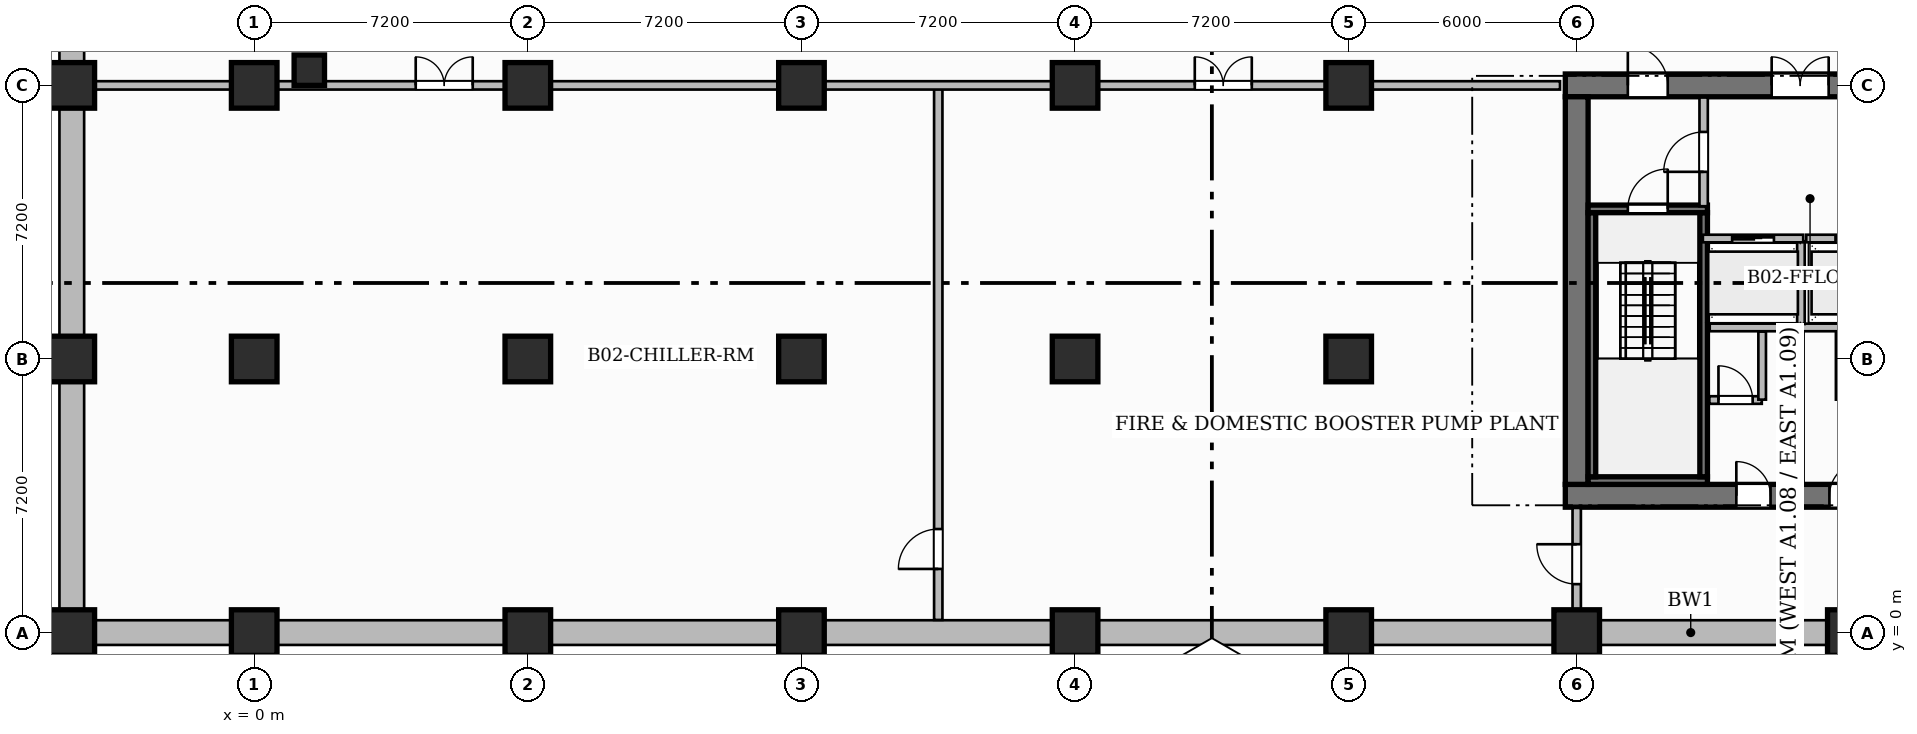
"""IFC4 building model, lengths in metres.
Left out: names, types, materials, properties, quantities, classifications, styles, units other than length and angle.
Written with IfcOpenShell. Run it as: python <this file> out.ifc"""

import sys

from ifc_helpers import new_model, si_unit, direction, frame, frame_2d, origin, origin_2d, place, context, subcontext, project, spatial, rectangle, extrude, source, transform, mapped, element, fill, save


model = new_model("IFC4")
c1 = context("Model", 3, precision=1e-05, world=origin(), true_north=direction((0.0, 1.0)))
c2 = subcontext(c1, "Body", "Model", "MODEL_VIEW")
j1 = project(units=[si_unit("LENGTHUNIT", "METRE"), si_unit("PLANEANGLEUNIT", "RADIAN")], contexts=[c1])
p1 = place(None, origin())
s1 = spatial("IfcSite", under=j1, at=p1, CompositionType="ELEMENT")
p2 = place(p1, origin())
s2 = spatial("IfcBuilding", under=s1, at=p2, CompositionType="ELEMENT")
p3 = place(p2, frame((0.0, 0.0, -13.0)))
s3 = spatial("IfcBuildingStorey", under=s2, at=p3, CompositionType="ELEMENT", Elevation=-13.0)
p4 = place(p3, frame((-4.8, 0.0, -0.4), z_axis=(0.0, 0.0, 1.0), x_axis=(1.0, 0.0, 0.0)))
e1 = element("IfcWall", 1, at=p4, inside=s3, PredefinedType="USERDEFINED", context=c2, shape_type="SweptSolid", body=[
    extrude(rectangle(XDim=85.2, YDim=0.65, at=frame_2d((42.6, 0.0))), origin(), (0.0, 0.0, 1.0), 6.9),
])
p5 = place(p3, frame((-4.8, 46.45, -0.4), z_axis=(0.0, 0.0, 1.0), x_axis=(0.0, -1.0, 0.0)))
e2 = element("IfcWall", 2, at=p5, inside=s3, PredefinedType="USERDEFINED", context=c2, shape_type="SweptSolid", body=[
    extrude(rectangle(XDim=46.1, YDim=0.65, at=frame_2d((23.05, 0.0))), origin(), (0.0, 0.0, 1.0), 6.9),
])
p6 = place(p3, frame((34.5, 3.6, -0.4), z_axis=(0.0, 0.0, 1.0), x_axis=(1.0, 0.0, 0.0)))
e3 = element("IfcWall", 3, at=p6, inside=s3, PredefinedType="SHEAR", context=c2, shape_type="SweptSolid", body=[
    extrude(rectangle(XDim=15.6, YDim=0.6, at=frame_2d((7.8, 0.0))), origin(), (0.0, 0.0, 1.0), 6.9),
])
p7 = place(p6, frame((4.5, 0.0, 0.4)))
e4 = element("IfcOpeningElement", 4, at=p7, cuts=e3, PredefinedType="OPENING", context=c2, shape_type="SweptSolid", body=[
    extrude(rectangle(XDim=0.9, YDim=2.1, at=frame_2d((0.45, 1.05))), frame((0.0, 0.31, 0.0), z_axis=(0.0, -1.0, 0.0), x_axis=(1.0, 0.0, 0.0)), (0.0, 0.0, 1.0), 0.62),
])
p8 = place(p6, frame((6.95, 0.0, 0.4)))
e5 = element("IfcOpeningElement", 5, at=p8, cuts=e3, PredefinedType="OPENING", context=c2, shape_type="SweptSolid", body=[
    extrude(rectangle(XDim=0.9, YDim=2.1, at=frame_2d((0.45, 1.05))), frame((0.0, 0.31, 0.0), z_axis=(0.0, -1.0, 0.0), x_axis=(1.0, 0.0, 0.0)), (0.0, 0.0, 1.0), 0.62),
])
p9 = place(p3, frame((34.5, 14.4, -0.4), z_axis=(0.0, 0.0, 1.0), x_axis=(1.0, 0.0, 0.0)))
e6 = element("IfcWall", 6, at=p9, inside=s3, PredefinedType="SHEAR", context=c2, shape_type="SweptSolid", body=[
    extrude(rectangle(XDim=15.6, YDim=0.6, at=frame_2d((7.8, 0.0))), origin(), (0.0, 0.0, 1.0), 6.9),
])
p10 = place(p9, frame((5.43, 0.0, 0.4)))
e7 = element("IfcOpeningElement", 7, at=p10, cuts=e6, PredefinedType="OPENING", context=c2, shape_type="SweptSolid", body=[
    extrude(rectangle(XDim=1.5, YDim=2.2, at=frame_2d((0.75, 1.1))), frame((0.0, 0.31, 0.0), z_axis=(0.0, -1.0, 0.0), x_axis=(1.0, 0.0, 0.0)), (0.0, 0.0, 1.0), 0.62),
])
p11 = place(p9, frame((1.645, 0.0, 0.4)))
e8 = element("IfcOpeningElement", 8, at=p11, cuts=e6, PredefinedType="OPENING", context=c2, shape_type="SweptSolid", body=[
    extrude(rectangle(XDim=1.05, YDim=2.15, at=frame_2d((0.525, 1.075))), frame((0.0, 0.31, 0.0), z_axis=(0.0, -1.0, 0.0), x_axis=(1.0, 0.0, 0.0)), (0.0, 0.0, 1.0), 0.62),
])
p12 = place(p9, frame((11.275, 0.0, 0.4)))
e9 = element("IfcOpeningElement", 9, at=p12, cuts=e6, PredefinedType="OPENING", context=c2, shape_type="SweptSolid", body=[
    extrude(rectangle(XDim=1.05, YDim=2.15, at=frame_2d((0.525, 1.075))), frame((0.0, 0.31, 0.0), z_axis=(0.0, -1.0, 0.0), x_axis=(1.0, 0.0, 0.0)), (0.0, 0.0, 1.0), 0.62),
])
p13 = place(p3, frame((34.8, 3.9, -0.4), z_axis=(0.0, 0.0, 1.0), x_axis=(0.0, 1.0, 0.0)))
e10 = element("IfcWall", 10, at=p13, inside=s3, PredefinedType="SHEAR", context=c2, shape_type="SweptSolid", body=[
    extrude(rectangle(XDim=10.2, YDim=0.6, at=frame_2d((5.1, 0.0))), origin(), (0.0, 0.0, 1.0), 6.9),
])
m1 = source(origin(), c2, "Body", "SweptSolid", [
    extrude(rectangle(XDim=1.2, YDim=1.2, at=origin_2d()), origin(), (0.0, 0.0, 1.0), 6.9),
])
for number, where, z_axis, x_axis in (
    (11, (-4.8, 0.0, -0.4), (0.0, 0.0, 1.0), (1.0, 0.0, 0.0)),
    (12, (-4.8, 7.2, -0.4), (0.0, 0.0, 1.0), (1.0, 0.0, 0.0)),
    (13, (-4.8, 14.4, -0.4), (0.0, 0.0, 1.0), (1.0, 0.0, 0.0)),
    (14, (0.0, 0.0, -0.4), (0.0, 0.0, 1.0), (1.0, 0.0, 0.0)),
    (15, (0.0, 7.2, -0.4), (0.0, 0.0, 1.0), (1.0, 0.0, 0.0)),
    (16, (0.0, 14.4, -0.4), (0.0, 0.0, 1.0), (1.0, 0.0, 0.0)),
    (17, (7.2, 0.0, -0.4), (0.0, 0.0, 1.0), (1.0, 0.0, 0.0)),
    (18, (7.2, 7.2, -0.4), (0.0, 0.0, 1.0), (1.0, 0.0, 0.0)),
    (19, (7.2, 14.4, -0.4), (0.0, 0.0, 1.0), (1.0, 0.0, 0.0)),
    (20, (14.4, 0.0, -0.4), (0.0, 0.0, 1.0), (1.0, 0.0, 0.0)),
    (21, (14.4, 7.2, -0.4), (0.0, 0.0, 1.0), (1.0, 0.0, 0.0)),
    (22, (14.4, 14.4, -0.4), (0.0, 0.0, 1.0), (1.0, 0.0, 0.0)),
    (23, (21.6, 0.0, -0.4), (0.0, 0.0, 1.0), (1.0, 0.0, 0.0)),
    (24, (21.6, 7.2, -0.4), (0.0, 0.0, 1.0), (1.0, 0.0, 0.0)),
    (25, (21.6, 14.4, -0.4), (0.0, 0.0, 1.0), (1.0, 0.0, 0.0)),
    (26, (28.8, 0.0, -0.4), (0.0, 0.0, 1.0), (1.0, 0.0, 0.0)),
    (27, (28.8, 7.2, -0.4), (0.0, 0.0, 1.0), (1.0, 0.0, 0.0)),
    (28, (28.8, 14.4, -0.4), (0.0, 0.0, 1.0), (1.0, 0.0, 0.0)),
    (29, (34.8, 0.0, -0.4), (0.0, 0.0, 1.0), (1.0, 0.0, 0.0)),
    (30, (42.0, 0.0, -0.4), (0.0, 0.0, 1.0), (1.0, 0.0, 0.0)),
):
    element("IfcColumn", number, at=place(p3, frame(where, z_axis=z_axis, x_axis=x_axis)), inside=s3, PredefinedType="COLUMN", context=c2, shape_type="MappedRepresentation", body=[
        mapped(m1, transform((0.0, 0.0, 0.0), scale=1.0)),
    ])
m2 = source(origin(), c2, "Body", "SweptSolid", [
    extrude(rectangle(XDim=0.8, YDim=0.8, at=origin_2d()), origin(), (0.0, 0.0, 1.0), 6.9),
])
p14 = place(p3, frame((1.45, 14.8, -0.4), z_axis=(0.0, 0.0, 1.0), x_axis=(1.0, 0.0, 0.0)))
e31 = element("IfcColumn", 31, at=p14, inside=s3, PredefinedType="COLUMN", context=c2, shape_type="MappedRepresentation", body=[
    mapped(m2, transform((0.0, 0.0, 0.0), scale=1.0)),
])
p15 = place(p3, frame((35.1, 4.0, -0.4), z_axis=(0.0, 0.0, 1.0), x_axis=(1.0, 0.0, 0.0)))
e32 = element("IfcWall", 32, at=p15, inside=s3, PredefinedType="SHEAR", context=c2, shape_type="SweptSolid", body=[
    extrude(rectangle(XDim=3.14, YDim=0.2, at=frame_2d((1.57, 0.0))), origin(), (0.0, 0.0, 1.0), 6.9),
])
for number, where, z_axis, x_axis in (
    (33, (35.2, 4.1, -0.4), (0.0, 0.0, 1.0), (0.0, 1.0, 0.0)),
    (34, (38.14, 4.1, -0.4), (0.0, 0.0, 1.0), (0.0, 1.0, 0.0)),
):
    element("IfcWall", number, at=place(p3, frame(where, z_axis=z_axis, x_axis=x_axis)), inside=s3, PredefinedType="SHEAR", context=c2, shape_type="SweptSolid", body=[
        extrude(rectangle(XDim=6.95, YDim=0.2, at=frame_2d((3.475, 0.0))), origin(), (0.0, 0.0, 1.0), 6.9),
    ])
p16 = place(p3, frame((35.1, 11.15, -0.4), z_axis=(0.0, 0.0, 1.0), x_axis=(1.0, 0.0, 0.0)))
e35 = element("IfcWall", 35, at=p16, inside=s3, PredefinedType="SHEAR", context=c2, shape_type="SweptSolid", body=[
    extrude(rectangle(XDim=3.14, YDim=0.2, at=frame_2d((1.57, 0.0))), origin(), (0.0, 0.0, 1.0), 6.9),
])
p17 = place(p16, frame((1.045, 0.0, 0.4)))
e36 = element("IfcOpeningElement", 36, at=p17, cuts=e35, PredefinedType="OPENING", context=c2, shape_type="SweptSolid", body=[
    extrude(rectangle(XDim=1.05, YDim=2.2, at=frame_2d((0.525, 1.1))), frame((0.0, 0.11, 0.0), z_axis=(0.0, -1.0, 0.0), x_axis=(1.0, 0.0, 0.0)), (0.0, 0.0, 1.0), 0.22),
])
p18 = place(p3, frame((38.3, 8.03, 0.0), z_axis=(0.0, 0.0, 1.0), x_axis=(1.0, 0.0, 0.0)))
e37 = element("IfcWall", 37, at=p18, inside=s3, PredefinedType="PARTITIONING", context=c2, shape_type="SweptSolid", body=[
    extrude(rectangle(XDim=4.74, YDim=0.2, at=frame_2d((2.37, 0.0))), origin(), (0.0, 0.0, 1.0), 6.1),
])
p19 = place(p3, frame((40.7, 8.12, 0.0), z_axis=(0.0, 0.0, 1.0), x_axis=(0.0, 1.0, 0.0)))
e38 = element("IfcWall", 38, at=p19, inside=s3, PredefinedType="PARTITIONING", context=c2, shape_type="SweptSolid", body=[
    extrude(rectangle(XDim=2.18, YDim=0.2, at=frame_2d((1.09, 0.0))), origin(), (0.0, 0.0, 1.0), 6.1),
])
p20 = place(p3, frame((38.14, 11.22, 0.0), z_axis=(0.0, 0.0, 1.0), x_axis=(0.0, 1.0, 0.0)))
e39 = element("IfcWall", 39, at=p20, inside=s3, PredefinedType="PARTITIONING", context=c2, shape_type="SweptSolid", body=[
    extrude(rectangle(XDim=2.86, YDim=0.22, at=frame_2d((1.43, 0.0))), origin(), (0.0, 0.0, 1.0), 6.1),
])
p21 = place(p20, frame((0.905, 0.0, 0.0)))
e40 = element("IfcOpeningElement", 40, at=p21, cuts=e39, PredefinedType="OPENING", context=c2, shape_type="SweptSolid", body=[
    extrude(rectangle(XDim=1.05, YDim=2.15, at=frame_2d((0.525, 1.075))), frame((0.0, 0.12, 0.0), z_axis=(0.0, -1.0, 0.0), x_axis=(1.0, 0.0, 0.0)), (0.0, 0.0, 1.0), 0.24),
])
p22 = place(p3, frame((38.29, 6.12, 0.0), z_axis=(0.0, 0.0, 1.0), x_axis=(1.0, 0.0, 0.0)))
e41 = element("IfcWall", 41, at=p22, inside=s3, PredefinedType="PARTITIONING", context=c2, shape_type="SweptSolid", body=[
    extrude(rectangle(XDim=1.38, YDim=0.2, at=frame_2d((0.69, 0.0))), origin(), (0.0, 0.0, 1.0), 6.1),
])
p23 = place(p22, frame((0.24, 0.0, 0.0)))
e42 = element("IfcOpeningElement", 42, at=p23, cuts=e41, PredefinedType="OPENING", context=c2, shape_type="SweptSolid", body=[
    extrude(rectangle(XDim=0.9, YDim=2.1, at=frame_2d((0.45, 1.05))), frame((0.0, 0.11, 0.0), z_axis=(0.0, -1.0, 0.0), x_axis=(1.0, 0.0, 0.0)), (0.0, 0.0, 1.0), 0.22),
])
for number, where, z_axis, x_axis in (
    (43, (39.68, 6.13, 0.0), (0.0, 0.0, 1.0), (0.0, 1.0, 0.0)),
    (44, (41.72, 6.13, 0.0), (0.0, 0.0, 1.0), (0.0, 1.0, 0.0)),
):
    element("IfcWall", number, at=place(p3, frame(where, z_axis=z_axis, x_axis=x_axis)), inside=s3, PredefinedType="PARTITIONING", context=c2, shape_type="SweptSolid", body=[
        extrude(rectangle(XDim=1.79, YDim=0.2, at=frame_2d((0.895, 0.0))), origin(), (0.0, 0.0, 1.0), 6.1),
    ])
p24 = place(p3, frame((40.7, 3.92, 0.0), z_axis=(0.0, 0.0, 1.0), x_axis=(0.0, 1.0, 0.0)))
e45 = element("IfcWall", 45, at=p24, inside=s3, PredefinedType="PARTITIONING", context=c2, shape_type="SweptSolid", body=[
    extrude(rectangle(XDim=3.99, YDim=0.14, at=frame_2d((1.995, 0.0))), origin(), (0.0, 0.0, 1.0), 6.1),
])
p25 = place(p3, frame((18.0, 0.333, 0.0), z_axis=(0.0, 0.0, 1.0), x_axis=(0.0, 1.0, 0.0)))
e46 = element("IfcWall", 46, at=p25, inside=s3, PredefinedType="PARTITIONING", context=c2, shape_type="SweptSolid", body=[
    extrude(rectangle(XDim=13.977, YDim=0.22, at=frame_2d((6.989, 0.0))), origin(), (0.0, 0.0, 1.0), 5.335),
])
p26 = place(p25, frame((1.342, 0.0, 0.0)))
e47 = element("IfcOpeningElement", 47, at=p26, cuts=e46, PredefinedType="OPENING", context=c2, shape_type="SweptSolid", body=[
    extrude(rectangle(XDim=1.05, YDim=2.15, at=frame_2d((0.525, 1.075))), frame((0.0, 0.12, 0.0), z_axis=(0.0, -1.0, 0.0), x_axis=(1.0, 0.0, 0.0)), (0.0, 0.0, 1.0), 0.24),
])
p27 = place(p3, frame((-4.31, 14.4, 0.0), z_axis=(0.0, 0.0, 1.0), x_axis=(1.0, 0.0, 0.0)))
e48 = element("IfcWall", 48, at=p27, inside=s3, PredefinedType="PARTITIONING", context=c2, shape_type="SweptSolid", body=[
    extrude(rectangle(XDim=38.67, YDim=0.22, at=frame_2d((19.335, 0.0))), origin(), (0.0, 0.0, 1.0), 5.185),
])
p28 = place(p27, frame((8.56, 0.0, 0.0)))
e49 = element("IfcOpeningElement", 49, at=p28, cuts=e48, PredefinedType="OPENING", context=c2, shape_type="SweptSolid", body=[
    extrude(rectangle(XDim=1.5, YDim=2.2, at=frame_2d((0.75, 1.1))), frame((0.0, 0.12, 0.0), z_axis=(0.0, -1.0, 0.0), x_axis=(1.0, 0.0, 0.0)), (0.0, 0.0, 1.0), 0.24),
])
p29 = place(p27, frame((29.06, 0.0, 0.0)))
e50 = element("IfcOpeningElement", 50, at=p29, cuts=e48, PredefinedType="OPENING", context=c2, shape_type="SweptSolid", body=[
    extrude(rectangle(XDim=1.5, YDim=2.2, at=frame_2d((0.75, 1.1))), frame((0.0, 0.12, 0.0), z_axis=(0.0, -1.0, 0.0), x_axis=(1.0, 0.0, 0.0)), (0.0, 0.0, 1.0), 0.24),
])
p30 = place(p3, frame((34.8, 0.37, 0.0), z_axis=(0.0, 0.0, 1.0), x_axis=(0.0, 1.0, 0.0)))
e51 = element("IfcWall", 51, at=p30, inside=s3, PredefinedType="PARTITIONING", context=c2, shape_type="SweptSolid", body=[
    extrude(rectangle(XDim=2.91, YDim=0.22, at=frame_2d((1.455, 0.0))), origin(), (0.0, 0.0, 1.0), 6.1),
])
p31 = place(p30, frame((0.905, 0.0, 0.0)))
e52 = element("IfcOpeningElement", 52, at=p31, cuts=e51, PredefinedType="OPENING", context=c2, shape_type="SweptSolid", body=[
    extrude(rectangle(XDim=1.05, YDim=2.15, at=frame_2d((0.525, 1.075))), frame((0.0, 0.12, 0.0), z_axis=(0.0, -1.0, 0.0), x_axis=(1.0, 0.0, 0.0)), (0.0, 0.0, 1.0), 0.24),
])
p32 = place(p3, frame((38.12, 10.37, 0.0), z_axis=(0.0, 0.0, 1.0), x_axis=(1.0, 0.0, 0.0)))
e53 = element("IfcWall", 53, at=p32, inside=s3, PredefinedType="PARTITIONING", context=c2, shape_type="SweptSolid", body=[
    extrude(rectangle(XDim=2.64, YDim=0.2, at=frame_2d((1.32, 0.0))), origin(), (0.0, 0.0, 1.0), 6.1),
])
p33 = place(p32, frame((0.77, 0.0, 0.0)))
e54 = element("IfcOpeningElement", 54, at=p33, cuts=e53, PredefinedType="OPENING", context=c2, shape_type="SweptSolid", body=[
    extrude(rectangle(XDim=1.1, YDim=2.2, at=frame_2d((0.55, 1.1))), frame((0.0, 0.11, 0.0), z_axis=(0.0, -1.0, 0.0), x_axis=(1.0, 0.0, 0.0)), (0.0, 0.0, 1.0), 0.22),
])
p34 = place(p3, frame((40.84, 10.37, 0.0), z_axis=(0.0, 0.0, 1.0), x_axis=(1.0, 0.0, 0.0)))
e55 = element("IfcWall", 55, at=p34, inside=s3, PredefinedType="PARTITIONING", context=c2, shape_type="SweptSolid", body=[
    extrude(rectangle(XDim=2.64, YDim=0.2, at=frame_2d((1.32, 0.0))), origin(), (0.0, 0.0, 1.0), 6.1),
])
p35 = place(p34, frame((0.77, 0.0, 0.0)))
e56 = element("IfcOpeningElement", 56, at=p35, cuts=e55, PredefinedType="OPENING", context=c2, shape_type="SweptSolid", body=[
    extrude(rectangle(XDim=1.1, YDim=2.2, at=frame_2d((0.55, 1.1))), frame((0.0, 0.11, 0.0), z_axis=(0.0, -1.0, 0.0), x_axis=(1.0, 0.0, 0.0)), (0.0, 0.0, 1.0), 0.22),
])
m3 = source(origin(), c2, "Body", "SweptSolid", [
    extrude(rectangle(XDim=1.05, YDim=2.2, at=frame_2d((0.525, 1.1))), frame((0.0, 0.025, 0.0), z_axis=(0.0, -1.0, 0.0), x_axis=(1.0, 0.0, 0.0)), (0.0, 0.0, 1.0), 0.05),
])
p36 = place(p17, origin())
e57 = element("IfcDoor", 57, at=p36, inside=s3, OperationType="SINGLE_SWING_RIGHT", PredefinedType="DOOR", context=c2, shape_type="MappedRepresentation", body=[
    mapped(m3, transform((0.0, 0.0, 0.0), scale=1.0)),
])
fill(e36, e57)
m4 = source(origin(), c2, "Body", "SweptSolid", [
    extrude(rectangle(XDim=1.05, YDim=2.15, at=frame_2d((0.525, 1.075))), frame((0.0, 0.025, 0.0), z_axis=(0.0, -1.0, 0.0), x_axis=(1.0, 0.0, 0.0)), (0.0, 0.0, 1.0), 0.05),
])
p37 = place(p21, origin())
e58 = element("IfcDoor", 58, at=p37, inside=s3, OperationType="SINGLE_SWING_LEFT", PredefinedType="DOOR", context=c2, shape_type="MappedRepresentation", body=[
    mapped(m4, transform((0.0, 0.0, 0.0), scale=1.0)),
])
fill(e40, e58)
m5 = source(origin(), c2, "Body", "SweptSolid", [
    extrude(rectangle(XDim=1.5, YDim=2.2, at=frame_2d((0.75, 1.1))), frame((0.0, 0.025, 0.0), z_axis=(0.0, -1.0, 0.0), x_axis=(1.0, 0.0, 0.0)), (0.0, 0.0, 1.0), 0.05),
])
p38 = place(p10, origin())
e59 = element("IfcDoor", 59, at=p38, inside=s3, OperationType="DOUBLE_DOOR_SINGLE_SWING", PredefinedType="DOOR", context=c2, shape_type="MappedRepresentation", body=[
    mapped(m5, transform((0.0, 0.0, 0.0), scale=1.0)),
])
fill(e7, e59)
p39 = place(p11, origin())
e60 = element("IfcDoor", 60, at=p39, inside=s3, OperationType="SINGLE_SWING_LEFT", PredefinedType="DOOR", context=c2, shape_type="MappedRepresentation", body=[
    mapped(m4, transform((0.0, 0.0, 0.0), scale=1.0)),
])
fill(e8, e60)
m6 = source(origin(), c2, "Body", "SweptSolid", [
    extrude(rectangle(XDim=0.9, YDim=2.1, at=frame_2d((0.45, 1.05))), frame((0.0, 0.025, 0.0), z_axis=(0.0, -1.0, 0.0), x_axis=(1.0, 0.0, 0.0)), (0.0, 0.0, 1.0), 0.05),
])
p40 = place(p23, origin())
e61 = element("IfcDoor", 61, at=p40, inside=s3, OperationType="SINGLE_SWING_LEFT", PredefinedType="DOOR", context=c2, shape_type="MappedRepresentation", body=[
    mapped(m6, transform((0.0, 0.0, 0.0), scale=1.0)),
])
fill(e42, e61)
p41 = place(p7, origin())
e62 = element("IfcDoor", 62, at=p41, inside=s3, OperationType="SINGLE_SWING_LEFT", PredefinedType="DOOR", context=c2, shape_type="MappedRepresentation", body=[
    mapped(m6, transform((0.0, 0.0, 0.0), scale=1.0)),
])
fill(e4, e62)
p42 = place(p8, origin())
e63 = element("IfcDoor", 63, at=p42, inside=s3, OperationType="SINGLE_SWING_RIGHT", PredefinedType="DOOR", context=c2, shape_type="MappedRepresentation", body=[
    mapped(m6, transform((0.0, 0.0, 0.0), scale=1.0)),
])
fill(e5, e63)
p43 = place(p28, origin())
e64 = element("IfcDoor", 64, at=p43, inside=s3, OperationType="DOUBLE_DOOR_SINGLE_SWING", PredefinedType="DOOR", context=c2, shape_type="MappedRepresentation", body=[
    mapped(m5, transform((0.0, 0.0, 0.0), scale=1.0)),
])
fill(e49, e64)
p44 = place(p29, origin())
e65 = element("IfcDoor", 65, at=p44, inside=s3, OperationType="DOUBLE_DOOR_SINGLE_SWING", PredefinedType="DOOR", context=c2, shape_type="MappedRepresentation", body=[
    mapped(m5, transform((0.0, 0.0, 0.0), scale=1.0)),
])
fill(e50, e65)
p45 = place(p26, origin())
e66 = element("IfcDoor", 66, at=p45, inside=s3, OperationType="SINGLE_SWING_LEFT", PredefinedType="DOOR", context=c2, shape_type="MappedRepresentation", body=[
    mapped(m4, transform((0.0, 0.0, 0.0), scale=1.0)),
])
fill(e47, e66)
p46 = place(p31, origin())
e67 = element("IfcDoor", 67, at=p46, inside=s3, OperationType="SINGLE_SWING_RIGHT", PredefinedType="DOOR", context=c2, shape_type="MappedRepresentation", body=[
    mapped(m4, transform((0.0, 0.0, 0.0), scale=1.0)),
])
fill(e52, e67)
m7 = source(origin(), c2, "Body", "SweptSolid", [
    extrude(rectangle(XDim=1.1, YDim=2.2, at=frame_2d((0.55, 1.1))), frame((0.0, 0.025, 0.0), z_axis=(0.0, -1.0, 0.0), x_axis=(1.0, 0.0, 0.0)), (0.0, 0.0, 1.0), 0.05),
])
p47 = place(p33, origin())
e68 = element("IfcDoor", 68, at=p47, inside=s3, OperationType="SLIDING_TO_LEFT", PredefinedType="DOOR", context=c2, shape_type="MappedRepresentation", body=[
    mapped(m7, transform((0.0, 0.0, 0.0), scale=1.0)),
])
fill(e54, e68)
p48 = place(p35, origin())
e69 = element("IfcDoor", 69, at=p48, inside=s3, OperationType="SLIDING_TO_LEFT", PredefinedType="DOOR", context=c2, shape_type="MappedRepresentation", body=[
    mapped(m7, transform((0.0, 0.0, 0.0), scale=1.0)),
])
fill(e56, e69)
save(model, sys.argv[1])
